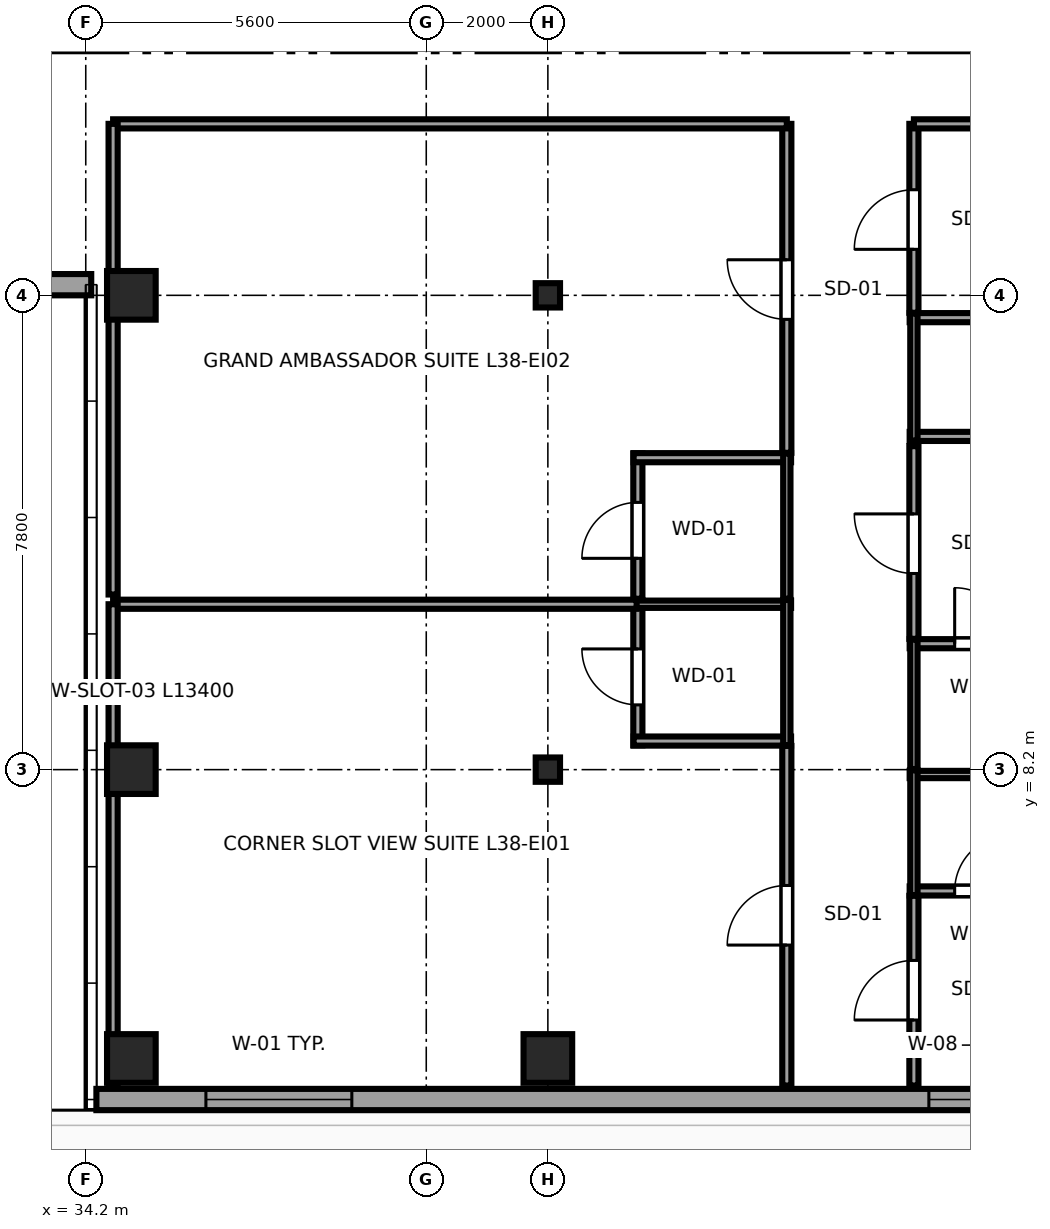
"""IFC4 building model, lengths in metres.
Left out: names, types, materials, properties, quantities, classifications, styles, units other than length and angle.
Written with IfcOpenShell. Run it as: python <this file> out.ifc"""

import sys

from ifc_helpers import new_model, si_unit, direction, frame, frame_2d, origin, origin_2d, place, context, subcontext, project, spatial, rectangle, i_section, extrude, source, transform, mapped, element, fill, save


model = new_model("IFC4")
c1 = context("Model", 3, precision=1e-05, world=origin(), true_north=direction((0.0, 1.0)))
c2 = subcontext(c1, "Body", "Model", "MODEL_VIEW")
j1 = project(units=[si_unit("LENGTHUNIT", "METRE"), si_unit("PLANEANGLEUNIT", "RADIAN")], contexts=[c1])
p1 = place(None, origin())
s1 = spatial("IfcSite", under=j1, at=p1, CompositionType="ELEMENT")
p2 = place(p1, origin())
s2 = spatial("IfcBuilding", under=s1, at=p2, CompositionType="ELEMENT")
p3 = place(p2, frame((0.0, 0.0, 147.05)))
s3 = spatial("IfcBuildingStorey", under=s2, at=p3, CompositionType="ELEMENT", Elevation=147.05)
m1 = source(origin(), c2, "Body", "SweptSolid", [
    extrude(rectangle(XDim=0.8, YDim=0.8, at=origin_2d()), origin(), (0.0, 0.0, 1.0), 3.55),
])
for number, where, z_axis, x_axis in (
    (1, (34.95, 3.45, 0.0), (0.0, 0.0, 1.0), (1.0, 0.0, 0.0)),
    (2, (34.95, 8.2, 0.0), (0.0, 0.0, 1.0), (1.0, 0.0, 0.0)),
    (3, (34.95, 16.0, 0.0), (0.0, 0.0, 1.0), (1.0, 0.0, 0.0)),
    (4, (41.8, 3.45, 0.0), (0.0, 0.0, 1.0), (1.0, 0.0, 0.0)),
):
    element("IfcColumn", number, at=place(p3, frame(where, z_axis=z_axis, x_axis=x_axis)), inside=s3, PredefinedType="COLUMN", context=c2, shape_type="MappedRepresentation", body=[
        mapped(m1, transform((0.0, 0.0, 0.0), x_axis=(1.0, 0.0, 0.0), y_axis=(0.0, 1.0, 0.0), z_axis=(0.0, 0.0, 1.0), scale=1.0)),
    ])
m2 = source(origin(), c2, "Body", "SweptSolid", [
    extrude(i_section(OverallWidth=0.4, OverallDepth=0.4, WebThickness=0.02, FlangeThickness=0.035, at=origin_2d()), origin(), (0.0, 0.0, 1.0), 3.55),
])
for number, where, z_axis, x_axis in (
    (5, (41.8, 8.2, 0.0), (0.0, 0.0, 1.0), (1.0, 0.0, 0.0)),
    (6, (41.8, 16.0, 0.0), (0.0, 0.0, 1.0), (1.0, 0.0, 0.0)),
):
    element("IfcColumn", number, at=place(p3, frame(where, z_axis=z_axis, x_axis=x_axis)), inside=s3, PredefinedType="COLUMN", context=c2, shape_type="MappedRepresentation", body=[
        mapped(m2, transform((0.0, 0.0, 0.0), x_axis=(1.0, 0.0, 0.0), y_axis=(0.0, 1.0, 0.0), z_axis=(0.0, 0.0, 1.0), scale=1.0)),
    ])
p4 = place(p3, frame((22.71, 16.175, 0.0), z_axis=(0.0, 0.0, 1.0), x_axis=(1.0, 0.0, 0.0)))
e7 = element("IfcWall", 7, at=p4, inside=s3, PredefinedType="SOLIDWALL", context=c2, shape_type="SweptSolid", body=[
    extrude(rectangle(XDim=11.58, YDim=0.35, at=frame_2d((5.79, 0.0))), origin(), (0.0, 0.0, 1.0), 2.16),
])
p5 = place(p3, frame((34.375, 2.775, 0.0), z_axis=(0.0, 0.0, 1.0), x_axis=(1.0, 0.0, 0.0)))
e8 = element("IfcWall", 8, at=p5, inside=s3, PredefinedType="SOLIDWALL", context=c2, shape_type="SweptSolid", body=[
    extrude(rectangle(XDim=15.608, YDim=0.35, at=frame_2d((7.804, 0.0))), origin(), (0.0, 0.0, 1.0), 3.37),
])
p6 = place(p5, frame((1.801, 0.0, 0.68)))
e9 = element("IfcOpeningElement", 9, at=p6, cuts=e8, PredefinedType="OPENING", context=c2, shape_type="SweptSolid", body=[
    extrude(rectangle(XDim=2.4, YDim=1.9, at=frame_2d((1.2, 0.95))), frame((0.0, 0.185, 0.0), z_axis=(0.0, -1.0, 0.0), x_axis=(1.0, 0.0, 0.0)), (0.0, 0.0, 1.0), 0.37),
])
p7 = place(p5, frame((13.691, 0.0, 0.62)))
e10 = element("IfcOpeningElement", 10, at=p7, cuts=e8, PredefinedType="OPENING", context=c2, shape_type="SweptSolid", body=[
    extrude(rectangle(XDim=1.5, YDim=1.55, at=frame_2d((0.75, 0.775))), frame((0.0, 0.185, 0.0), z_axis=(0.0, -1.0, 0.0), x_axis=(1.0, 0.0, 0.0)), (0.0, 0.0, 1.0), 0.37),
])
p8 = place(p3, frame((43.28, 8.6, 0.0), z_axis=(0.0, 0.0, 1.0), x_axis=(0.0, 1.0, 0.0)))
e11 = element("IfcWall", 11, at=p8, inside=s3, PredefinedType="PARTITIONING", context=c2, shape_type="SweptSolid", body=[
    extrude(rectangle(XDim=2.39, YDim=0.15, at=frame_2d((1.195, 0.0))), origin(), (0.0, 0.0, 1.0), 3.37),
])
p9 = place(p8, frame((0.665, 0.0, 0.0)))
e12 = element("IfcOpeningElement", 12, at=p9, cuts=e11, PredefinedType="OPENING", context=c2, shape_type="SweptSolid", body=[
    extrude(rectangle(XDim=0.92, YDim=2.01, at=frame_2d((0.46, 1.005))), frame((0.0, 0.085, 0.0), z_axis=(0.0, -1.0, 0.0), x_axis=(1.0, 0.0, 0.0)), (0.0, 0.0, 1.0), 0.17),
])
p10 = place(p3, frame((43.21, 8.67, 0.0), z_axis=(0.0, 0.0, 1.0), x_axis=(1.0, 0.0, 0.0)))
e13 = element("IfcWall", 13, at=p10, inside=s3, PredefinedType="PARTITIONING", context=c2, shape_type="SweptSolid", body=[
    extrude(rectangle(XDim=2.59, YDim=0.15, at=frame_2d((1.295, 0.0))), origin(), (0.0, 0.0, 1.0), 3.37),
])
p11 = place(p3, frame((43.21, 10.92, 0.0), z_axis=(0.0, 0.0, 1.0), x_axis=(1.0, 0.0, 0.0)))
e14 = element("IfcWall", 14, at=p11, inside=s3, PredefinedType="PLUMBINGWALL", context=c2, shape_type="SweptSolid", body=[
    extrude(rectangle(XDim=2.59, YDim=0.12, at=frame_2d((1.295, 0.0))), origin(), (0.0, 0.0, 1.0), 3.37),
])
p12 = place(p3, frame((45.73, 8.6, 0.0), z_axis=(0.0, 0.0, 1.0), x_axis=(0.0, 1.0, 0.0)))
e15 = element("IfcWall", 15, at=p12, inside=s3, PredefinedType="PLUMBINGWALL", context=c2, shape_type="SweptSolid", body=[
    extrude(rectangle(XDim=2.39, YDim=0.12, at=frame_2d((1.195, 0.0))), origin(), (0.0, 0.0, 1.0), 3.001),
])
p13 = place(p3, frame((43.28, 11.01, 0.0), z_axis=(0.0, 0.0, 1.0), x_axis=(0.0, 1.0, 0.0)))
e16 = element("IfcWall", 16, at=p13, inside=s3, PredefinedType="PARTITIONING", context=c2, shape_type="SweptSolid", body=[
    extrude(rectangle(XDim=2.39, YDim=0.15, at=frame_2d((1.195, 0.0))), origin(), (0.0, 0.0, 1.0), 3.37),
])
p14 = place(p13, frame((0.665, 0.0, 0.0)))
e17 = element("IfcOpeningElement", 17, at=p14, cuts=e16, PredefinedType="OPENING", context=c2, shape_type="SweptSolid", body=[
    extrude(rectangle(XDim=0.92, YDim=2.01, at=frame_2d((0.46, 1.005))), frame((0.0, 0.085, 0.0), z_axis=(0.0, -1.0, 0.0), x_axis=(1.0, 0.0, 0.0)), (0.0, 0.0, 1.0), 0.17),
])
p15 = place(p3, frame((43.21, 13.33, 0.0), z_axis=(0.0, 0.0, 1.0), x_axis=(1.0, 0.0, 0.0)))
e18 = element("IfcWall", 18, at=p15, inside=s3, PredefinedType="PARTITIONING", context=c2, shape_type="SweptSolid", body=[
    extrude(rectangle(XDim=2.59, YDim=0.15, at=frame_2d((1.295, 0.0))), origin(), (0.0, 0.0, 1.0), 3.37),
])
p16 = place(p3, frame((45.73, 11.01, 0.0), z_axis=(0.0, 0.0, 1.0), x_axis=(0.0, 1.0, 0.0)))
e19 = element("IfcWall", 19, at=p16, inside=s3, PredefinedType="PLUMBINGWALL", context=c2, shape_type="SweptSolid", body=[
    extrude(rectangle(XDim=2.39, YDim=0.12, at=frame_2d((1.195, 0.0))), origin(), (0.0, 0.0, 1.0), 3.001),
])
p17 = place(p3, frame((47.75, 6.205, 0.0), z_axis=(0.0, 0.0, 1.0), x_axis=(1.0, 0.0, 0.0)))
e20 = element("IfcWall", 20, at=p17, inside=s3, PredefinedType="PARTITIONING", context=c2, shape_type="SweptSolid", body=[
    extrude(rectangle(XDim=2.401, YDim=0.15, at=frame_2d((1.2, 0.0))), origin(), (0.0, 0.0, 1.0), 3.37),
])
p18 = place(p17, frame((0.74, 0.0, 0.0)))
e21 = element("IfcOpeningElement", 21, at=p18, cuts=e20, PredefinedType="OPENING", context=c2, shape_type="SweptSolid", body=[
    extrude(rectangle(XDim=0.92, YDim=2.01, at=frame_2d((0.46, 1.005))), frame((0.0, 0.085, 0.0), z_axis=(0.0, -1.0, 0.0), x_axis=(1.0, 0.0, 0.0)), (0.0, 0.0, 1.0), 0.17),
])
p19 = place(p3, frame((47.75, 8.12, 0.0), z_axis=(0.0, 0.0, 1.0), x_axis=(1.0, 0.0, 0.0)))
e22 = element("IfcWall", 22, at=p19, inside=s3, PredefinedType="PLUMBINGWALL", context=c2, shape_type="SweptSolid", body=[
    extrude(rectangle(XDim=2.401, YDim=0.12, at=frame_2d((1.2, 0.0))), origin(), (0.0, 0.0, 1.0), 2.16),
])
p20 = place(p3, frame((47.82, 6.135, 0.0), z_axis=(0.0, 0.0, 1.0), x_axis=(0.0, 1.0, 0.0)))
e23 = element("IfcWall", 23, at=p20, inside=s3, PredefinedType="PLUMBINGWALL", context=c2, shape_type="SweptSolid", body=[
    extrude(rectangle(XDim=2.055, YDim=0.12, at=frame_2d((1.027, 0.0))), origin(), (0.0, 0.0, 1.0), 3.37),
])
p21 = place(p3, frame((47.75, 10.271, 0.0), z_axis=(0.0, 0.0, 1.0), x_axis=(1.0, 0.0, 0.0)))
e24 = element("IfcWall", 24, at=p21, inside=s3, PredefinedType="PARTITIONING", context=c2, shape_type="SweptSolid", body=[
    extrude(rectangle(XDim=2.401, YDim=0.15, at=frame_2d((1.2, 0.0))), origin(), (0.0, 0.0, 1.0), 3.37),
])
p22 = place(p21, frame((0.74, 0.0, 0.0)))
e25 = element("IfcOpeningElement", 25, at=p22, cuts=e24, PredefinedType="OPENING", context=c2, shape_type="SweptSolid", body=[
    extrude(rectangle(XDim=0.92, YDim=2.01, at=frame_2d((0.46, 1.005))), frame((0.0, 0.085, 0.0), z_axis=(0.0, -1.0, 0.0), x_axis=(1.0, 0.0, 0.0)), (0.0, 0.0, 1.0), 0.17),
])
p23 = place(p3, frame((47.82, 8.21, 0.0), z_axis=(0.0, 0.0, 1.0), x_axis=(0.0, 1.0, 0.0)))
e26 = element("IfcWall", 26, at=p23, inside=s3, PredefinedType="PLUMBINGWALL", context=c2, shape_type="SweptSolid", body=[
    extrude(rectangle(XDim=2.131, YDim=0.12, at=frame_2d((1.065, 0.0))), origin(), (0.0, 0.0, 1.0), 3.37),
])
p24 = place(p3, frame((47.75, 13.68, 0.0), z_axis=(0.0, 0.0, 1.0), x_axis=(1.0, 0.0, 0.0)))
e27 = element("IfcWall", 27, at=p24, inside=s3, PredefinedType="PARTITIONING", context=c2, shape_type="SweptSolid", body=[
    extrude(rectangle(XDim=6.245, YDim=0.15, at=frame_2d((3.123, 0.0))), origin(), (0.0, 0.0, 1.0), 3.37),
])
p25 = place(p3, frame((47.75, 15.633, 0.0), z_axis=(0.0, 0.0, 1.0), x_axis=(1.0, 0.0, 0.0)))
e28 = element("IfcWall", 28, at=p25, inside=s3, PredefinedType="PARTITIONING", context=c2, shape_type="SweptSolid", body=[
    extrude(rectangle(XDim=2.401, YDim=0.15, at=frame_2d((1.2, 0.0))), origin(), (0.0, 0.0, 1.0), 3.37),
])
p26 = place(p3, frame((47.82, 13.61, 0.0), z_axis=(0.0, 0.0, 1.0), x_axis=(0.0, 1.0, 0.0)))
e29 = element("IfcWall", 29, at=p26, inside=s3, PredefinedType="PLUMBINGWALL", context=c2, shape_type="SweptSolid", body=[
    extrude(rectangle(XDim=2.093, YDim=0.12, at=frame_2d((1.046, 0.0))), origin(), (0.0, 0.0, 1.0), 3.37),
])
p27 = place(p3, frame((45.73, 3.005, 0.0), z_axis=(0.0, 0.0, 1.0), x_axis=(0.0, 1.0, 0.0)))
e30 = element("IfcWall", 30, at=p27, inside=s3, PredefinedType="PARTITIONING", context=c2, shape_type="SweptSolid", body=[
    extrude(rectangle(XDim=5.585, YDim=0.15, at=frame_2d((2.792, 0.0))), origin(), (0.0, 0.0, 1.0), 3.001),
])
p28 = place(p27, frame((2.31, 0.0, 0.0)))
e31 = element("IfcOpeningElement", 31, at=p28, cuts=e30, PredefinedType="OPENING", context=c2, shape_type="SweptSolid", body=[
    extrude(rectangle(XDim=0.98, YDim=2.12, at=frame_2d((0.49, 1.06))), frame((0.0, 0.085, 0.0), z_axis=(0.0, -1.0, 0.0), x_axis=(1.0, 0.0, 0.0)), (0.0, 0.0, 1.0), 0.17),
])
p29 = place(p3, frame((34.65, 10.92, 0.0), z_axis=(0.0, 0.0, 1.0), x_axis=(1.0, 0.0, 0.0)))
e32 = element("IfcWall", 32, at=p29, inside=s3, PredefinedType="PARTITIONING", context=c2, shape_type="SweptSolid", body=[
    extrude(rectangle(XDim=8.61, YDim=0.15, at=frame_2d((4.305, 0.0))), origin(), (0.0, 0.0, 1.0), 3.37),
])
p30 = place(p3, frame((34.65, 3.005, 0.0), z_axis=(0.0, 0.0, 1.0), x_axis=(0.0, 1.0, 0.0)))
e33 = element("IfcWall", 33, at=p30, inside=s3, PredefinedType="PARTITIONING", context=c2, shape_type="SweptSolid", body=[
    extrude(rectangle(XDim=7.915, YDim=0.15, at=frame_2d((3.958, 0.0))), origin(), (0.0, 0.0, 1.0), 2.16),
])
p31 = place(p3, frame((45.73, 13.41, 0.0), z_axis=(0.0, 0.0, 1.0), x_axis=(0.0, 1.0, 0.0)))
e34 = element("IfcWall", 34, at=p31, inside=s3, PredefinedType="PARTITIONING", context=c2, shape_type="SweptSolid", body=[
    extrude(rectangle(XDim=5.41, YDim=0.15, at=frame_2d((2.705, 0.0))), origin(), (0.0, 0.0, 1.0), 3.001),
])
p32 = place(p31, frame((2.195, 0.0, 0.0)))
e35 = element("IfcOpeningElement", 35, at=p32, cuts=e34, PredefinedType="OPENING", context=c2, shape_type="SweptSolid", body=[
    extrude(rectangle(XDim=0.98, YDim=2.12, at=frame_2d((0.49, 1.06))), frame((0.0, 0.085, 0.0), z_axis=(0.0, -1.0, 0.0), x_axis=(1.0, 0.0, 0.0)), (0.0, 0.0, 1.0), 0.17),
])
p33 = place(p3, frame((34.65, 18.82, 0.0), z_axis=(0.0, 0.0, 1.0), x_axis=(1.0, 0.0, 0.0)))
e36 = element("IfcWall", 36, at=p33, inside=s3, PredefinedType="PARTITIONING", context=c2, shape_type="SweptSolid", body=[
    extrude(rectangle(XDim=11.08, YDim=0.15, at=frame_2d((5.54, 0.0))), origin(), (0.0, 0.0, 1.0), 3.37),
])
p34 = place(p3, frame((34.65, 11.08, 0.0), z_axis=(0.0, 0.0, 1.0), x_axis=(0.0, 1.0, 0.0)))
e37 = element("IfcWall", 37, at=p34, inside=s3, PredefinedType="PARTITIONING", context=c2, shape_type="SweptSolid", body=[
    extrude(rectangle(XDim=7.74, YDim=0.15, at=frame_2d((3.87, 0.0))), origin(), (0.0, 0.0, 1.0), 2.16),
])
p35 = place(p3, frame((47.82, 3.005, 0.0), z_axis=(0.0, 0.0, 1.0), x_axis=(0.0, 1.0, 0.0)))
e38 = element("IfcWall", 38, at=p35, inside=s3, PredefinedType="PARTITIONING", context=c2, shape_type="SweptSolid", body=[
    extrude(rectangle(XDim=3.12, YDim=0.15, at=frame_2d((1.56, 0.0))), origin(), (0.0, 0.0, 1.0), 3.37),
])
p36 = place(p35, frame((1.077, 0.0, 0.0)))
e39 = element("IfcOpeningElement", 39, at=p36, cuts=e38, PredefinedType="OPENING", context=c2, shape_type="SweptSolid", body=[
    extrude(rectangle(XDim=0.98, YDim=2.12, at=frame_2d((0.49, 1.06))), frame((0.0, 0.085, 0.0), z_axis=(0.0, -1.0, 0.0), x_axis=(1.0, 0.0, 0.0)), (0.0, 0.0, 1.0), 0.17),
])
p37 = place(p3, frame((47.82, 10.351, 0.0), z_axis=(0.0, 0.0, 1.0), x_axis=(0.0, 1.0, 0.0)))
e40 = element("IfcWall", 40, at=p37, inside=s3, PredefinedType="PARTITIONING", context=c2, shape_type="SweptSolid", body=[
    extrude(rectangle(XDim=3.169, YDim=0.15, at=frame_2d((1.584, 0.0))), origin(), (0.0, 0.0, 1.0), 3.37),
])
p38 = place(p37, frame((1.074, 0.0, 0.0)))
e41 = element("IfcOpeningElement", 41, at=p38, cuts=e40, PredefinedType="OPENING", context=c2, shape_type="SweptSolid", body=[
    extrude(rectangle(XDim=0.98, YDim=2.12, at=frame_2d((0.49, 1.06))), frame((0.0, 0.085, 0.0), z_axis=(0.0, -1.0, 0.0), x_axis=(1.0, 0.0, 0.0)), (0.0, 0.0, 1.0), 0.17),
])
p39 = place(p3, frame((47.82, 15.713, 0.0), z_axis=(0.0, 0.0, 1.0), x_axis=(0.0, 1.0, 0.0)))
e42 = element("IfcWall", 42, at=p39, inside=s3, PredefinedType="PARTITIONING", context=c2, shape_type="SweptSolid", body=[
    extrude(rectangle(XDim=3.107, YDim=0.15, at=frame_2d((1.554, 0.0))), origin(), (0.0, 0.0, 1.0), 3.37),
])
p40 = place(p39, frame((1.043, 0.0, 0.0)))
e43 = element("IfcOpeningElement", 43, at=p40, cuts=e42, PredefinedType="OPENING", context=c2, shape_type="SweptSolid", body=[
    extrude(rectangle(XDim=0.98, YDim=2.12, at=frame_2d((0.49, 1.06))), frame((0.0, 0.085, 0.0), z_axis=(0.0, -1.0, 0.0), x_axis=(1.0, 0.0, 0.0)), (0.0, 0.0, 1.0), 0.17),
])
p41 = place(p3, frame((47.82, 18.82, 0.0), z_axis=(0.0, 0.0, 1.0), x_axis=(1.0, 0.0, 0.0)))
e44 = element("IfcWall", 44, at=p41, inside=s3, PredefinedType="PARTITIONING", context=c2, shape_type="SweptSolid", body=[
    extrude(rectangle(XDim=6.175, YDim=0.15, at=frame_2d((3.087, 0.0))), origin(), (0.0, 0.0, 1.0), 3.37),
])
m3 = source(origin(), c2, "Body", "SweptSolid", [
    extrude(rectangle(XDim=2.4, YDim=1.9, at=frame_2d((1.2, 0.95))), frame((0.0, 0.09, 0.0), z_axis=(0.0, -1.0, 0.0), x_axis=(1.0, 0.0, 0.0)), (0.0, 0.0, 1.0), 0.06),
])
p42 = place(p6, origin())
e45 = element("IfcWindow", 45, at=p42, inside=s3, PartitioningType="TRIPLE_PANEL_HORIZONTAL", PredefinedType="WINDOW", context=c2, shape_type="MappedRepresentation", body=[
    mapped(m3, transform((0.0, 0.0, 0.0), x_axis=(1.0, 0.0, 0.0), y_axis=(0.0, 1.0, 0.0), z_axis=(0.0, 0.0, 1.0), scale=1.0)),
])
fill(e9, e45)
m4 = source(origin(), c2, "Body", "SweptSolid", [
    extrude(rectangle(XDim=1.5, YDim=1.55, at=frame_2d((0.75, 0.775))), frame((0.0, 0.09, 0.0), z_axis=(0.0, -1.0, 0.0), x_axis=(1.0, 0.0, 0.0)), (0.0, 0.0, 1.0), 0.06),
])
p43 = place(p7, origin())
e46 = element("IfcWindow", 46, at=p43, inside=s3, PartitioningType="SINGLE_PANEL", PredefinedType="WINDOW", context=c2, shape_type="MappedRepresentation", body=[
    mapped(m4, transform((0.0, 0.0, 0.0), x_axis=(1.0, 0.0, 0.0), y_axis=(0.0, 1.0, 0.0), z_axis=(0.0, 0.0, 1.0), scale=1.0)),
])
fill(e10, e46)
m5 = source(origin(), c2, "Body", "SweptSolid", [
    extrude(rectangle(XDim=0.92, YDim=2.01, at=frame_2d((0.46, 1.005))), frame((0.0, 0.025, 0.0), z_axis=(0.0, -1.0, 0.0), x_axis=(1.0, 0.0, 0.0)), (0.0, 0.0, 1.0), 0.05),
])
p44 = place(p9, origin())
e47 = element("IfcDoor", 47, at=p44, inside=s3, OperationType="SINGLE_SWING_RIGHT", PredefinedType="DOOR", context=c2, shape_type="MappedRepresentation", body=[
    mapped(m5, transform((0.0, 0.0, 0.0), x_axis=(1.0, 0.0, 0.0), y_axis=(0.0, 1.0, 0.0), z_axis=(0.0, 0.0, 1.0), scale=1.0)),
])
fill(e12, e47)
p45 = place(p14, origin())
e48 = element("IfcDoor", 48, at=p45, inside=s3, OperationType="SINGLE_SWING_LEFT", PredefinedType="DOOR", context=c2, shape_type="MappedRepresentation", body=[
    mapped(m5, transform((0.0, 0.0, 0.0), x_axis=(1.0, 0.0, 0.0), y_axis=(0.0, 1.0, 0.0), z_axis=(0.0, 0.0, 1.0), scale=1.0)),
])
fill(e17, e48)
p46 = place(p18, origin())
e49 = element("IfcDoor", 49, at=p46, inside=s3, OperationType="SINGLE_SWING_RIGHT", PredefinedType="DOOR", context=c2, shape_type="MappedRepresentation", body=[
    mapped(m5, transform((0.0, 0.0, 0.0), x_axis=(1.0, 0.0, 0.0), y_axis=(0.0, 1.0, 0.0), z_axis=(0.0, 0.0, 1.0), scale=1.0)),
])
fill(e21, e49)
p47 = place(p22, origin())
e50 = element("IfcDoor", 50, at=p47, inside=s3, OperationType="SINGLE_SWING_LEFT", PredefinedType="DOOR", context=c2, shape_type="MappedRepresentation", body=[
    mapped(m5, transform((0.0, 0.0, 0.0), x_axis=(1.0, 0.0, 0.0), y_axis=(0.0, 1.0, 0.0), z_axis=(0.0, 0.0, 1.0), scale=1.0)),
])
fill(e25, e50)
m6 = source(origin(), c2, "Body", "SweptSolid", [
    extrude(rectangle(XDim=0.98, YDim=2.12, at=frame_2d((0.49, 1.06))), frame((0.0, 0.025, 0.0), z_axis=(0.0, -1.0, 0.0), x_axis=(1.0, 0.0, 0.0)), (0.0, 0.0, 1.0), 0.05),
])
p48 = place(p28, origin())
e51 = element("IfcDoor", 51, at=p48, inside=s3, OperationType="SINGLE_SWING_LEFT", PredefinedType="DOOR", context=c2, shape_type="MappedRepresentation", body=[
    mapped(m6, transform((0.0, 0.0, 0.0), x_axis=(1.0, 0.0, 0.0), y_axis=(0.0, 1.0, 0.0), z_axis=(0.0, 0.0, 1.0), scale=1.0)),
])
fill(e31, e51)
p49 = place(p32, origin())
e52 = element("IfcDoor", 52, at=p49, inside=s3, OperationType="SINGLE_SWING_RIGHT", PredefinedType="DOOR", context=c2, shape_type="MappedRepresentation", body=[
    mapped(m6, transform((0.0, 0.0, 0.0), x_axis=(1.0, 0.0, 0.0), y_axis=(0.0, 1.0, 0.0), z_axis=(0.0, 0.0, 1.0), scale=1.0)),
])
fill(e35, e52)
p50 = place(p36, origin())
e53 = element("IfcDoor", 53, at=p50, inside=s3, OperationType="SINGLE_SWING_LEFT", PredefinedType="DOOR", context=c2, shape_type="MappedRepresentation", body=[
    mapped(m6, transform((0.0, 0.0, 0.0), x_axis=(1.0, 0.0, 0.0), y_axis=(0.0, 1.0, 0.0), z_axis=(0.0, 0.0, 1.0), scale=1.0)),
])
fill(e39, e53)
p51 = place(p38, origin())
e54 = element("IfcDoor", 54, at=p51, inside=s3, OperationType="SINGLE_SWING_RIGHT", PredefinedType="DOOR", context=c2, shape_type="MappedRepresentation", body=[
    mapped(m6, transform((0.0, 0.0, 0.0), x_axis=(1.0, 0.0, 0.0), y_axis=(0.0, 1.0, 0.0), z_axis=(0.0, 0.0, 1.0), scale=1.0)),
])
fill(e41, e54)
p52 = place(p40, origin())
e55 = element("IfcDoor", 55, at=p52, inside=s3, OperationType="SINGLE_SWING_LEFT", PredefinedType="DOOR", context=c2, shape_type="MappedRepresentation", body=[
    mapped(m6, transform((0.0, 0.0, 0.0), x_axis=(1.0, 0.0, 0.0), y_axis=(0.0, 1.0, 0.0), z_axis=(0.0, 0.0, 1.0), scale=1.0)),
])
fill(e43, e55)
save(model, sys.argv[1])
